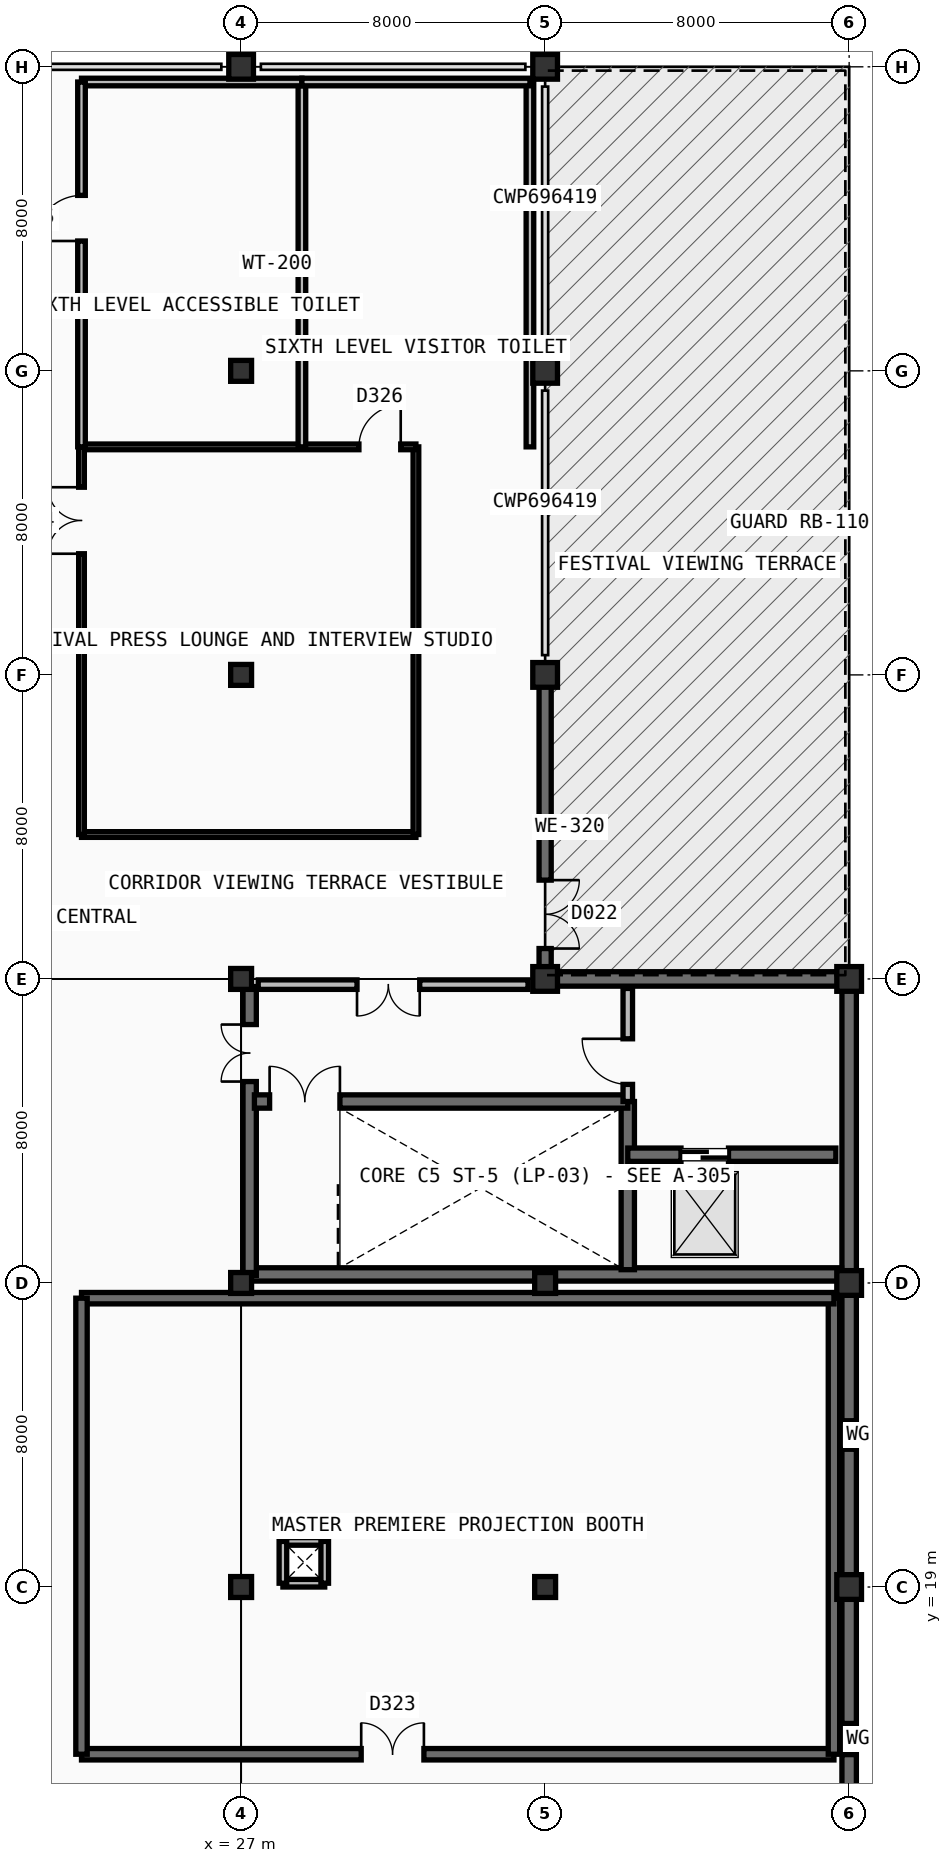
"""IFC4 building model, lengths in metres.
Left out: names, types, materials, properties, quantities, classifications, styles, units other than length and angle.
Written with IfcOpenShell. Run it as: python <this file> out.ifc"""

import sys

from ifc_helpers import new_model, si_unit, direction, frame, frame_2d, origin, origin_2d, place, context, subcontext, project, spatial, rectangle, extrude, element, fill, save


model = new_model("IFC4")
c1 = context("Model", 3, precision=1e-05, world=origin(), true_north=direction((0.0, 1.0)))
c2 = subcontext(c1, "Body", "Model", "MODEL_VIEW")
j1 = project(units=[si_unit("LENGTHUNIT", "METRE"), si_unit("PLANEANGLEUNIT", "RADIAN")], contexts=[c1])
p1 = place(None, origin())
s1 = spatial("IfcSite", under=j1, at=p1, CompositionType="ELEMENT")
p2 = place(p1, origin())
s2 = spatial("IfcBuilding", under=s1, at=p2, CompositionType="ELEMENT")
p3 = place(p2, frame((0.0, 0.0, 27.9)))
s3 = spatial("IfcBuildingStorey", under=s2, at=p3, CompositionType="ELEMENT", Elevation=27.9)
for number, where, z_axis, x_axis in (
    (1, (27.0, 19.0, 0.0), (0.0, 0.0, 1.0), (1.0, 0.0, 0.0)),
    (2, (27.0, 27.0, 0.0), (0.0, 0.0, 1.0), (1.0, 0.0, 0.0)),
    (3, (27.0, 35.0, 0.0), (0.0, 0.0, 1.0), (1.0, 0.0, 0.0)),
    (4, (27.0, 43.0, 0.0), (0.0, 0.0, 1.0), (1.0, 0.0, 0.0)),
    (5, (27.0, 51.0, 0.0), (0.0, 0.0, 1.0), (1.0, 0.0, 0.0)),
):
    element("IfcColumn", number, at=place(p3, frame(where, z_axis=z_axis, x_axis=x_axis)), inside=s3, PredefinedType="COLUMN", context=c2, shape_type="SweptSolid", body=[
        extrude(rectangle(XDim=0.55, YDim=0.55, at=origin_2d()), origin(), (0.0, 0.0, 1.0), 4.8),
    ])
p4 = place(p3, frame((27.0, 59.0, 0.0), z_axis=(0.0, 0.0, 1.0), x_axis=(1.0, 0.0, 0.0)))
e6 = element("IfcColumn", 6, at=p4, inside=s3, PredefinedType="COLUMN", context=c2, shape_type="SweptSolid", body=[
    extrude(rectangle(XDim=0.65, YDim=0.65, at=origin_2d()), origin(), (0.0, 0.0, 1.0), 4.8),
])
for number, where, z_axis, x_axis in (
    (7, (35.0, 19.0, 0.0), (0.0, 0.0, 1.0), (1.0, 0.0, 0.0)),
    (8, (35.0, 27.0, 0.0), (0.0, 0.0, 1.0), (1.0, 0.0, 0.0)),
):
    element("IfcColumn", number, at=place(p3, frame(where, z_axis=z_axis, x_axis=x_axis)), inside=s3, PredefinedType="COLUMN", context=c2, shape_type="SweptSolid", body=[
        extrude(rectangle(XDim=0.55, YDim=0.55, at=origin_2d()), origin(), (0.0, 0.0, 1.0), 4.8),
    ])
for number, where, z_axis, x_axis in (
    (9, (35.0, 35.0, 0.0), (0.0, 0.0, 1.0), (1.0, 0.0, 0.0)),
    (10, (35.0, 43.0, 0.0), (0.0, 0.0, 1.0), (1.0, 0.0, 0.0)),
    (11, (35.0, 51.0, 0.0), (0.0, 0.0, 1.0), (1.0, 0.0, 0.0)),
    (12, (35.0, 59.0, 0.0), (0.0, 0.0, 1.0), (1.0, 0.0, 0.0)),
    (13, (43.0, 19.0, 0.0), (0.0, 0.0, 1.0), (1.0, 0.0, 0.0)),
    (14, (43.0, 27.0, 0.0), (0.0, 0.0, 1.0), (1.0, 0.0, 0.0)),
    (15, (43.0, 35.0, 0.0), (0.0, 0.0, 1.0), (1.0, 0.0, 0.0)),
):
    element("IfcColumn", number, at=place(p3, frame(where, z_axis=z_axis, x_axis=x_axis)), inside=s3, PredefinedType="COLUMN", context=c2, shape_type="SweptSolid", body=[
        extrude(rectangle(XDim=0.65, YDim=0.65, at=origin_2d()), origin(), (0.0, 0.0, 1.0), 4.8),
    ])
p5 = place(p3, frame((35.0, 43.0, 0.0), z_axis=(0.0, 0.0, 1.0), x_axis=(0.0, -1.0, 0.0)))
e16 = element("IfcWall", 16, at=p5, inside=s3, PredefinedType="SOLIDWALL", context=c2, shape_type="SweptSolid", body=[
    extrude(rectangle(XDim=8.0, YDim=0.32, at=frame_2d((4.0, 0.0))), origin(), (0.0, 0.0, 1.0), 4.8),
])
p6 = place(p5, frame((5.4, 0.0, 0.0)))
e17 = element("IfcOpeningElement", 17, at=p6, cuts=e16, PredefinedType="OPENING", context=c2, shape_type="SweptSolid", body=[
    extrude(rectangle(XDim=1.8, YDim=2.3, at=frame_2d((0.9, 1.15))), frame((0.0, 0.17, 0.0), z_axis=(0.0, -1.0, 0.0), x_axis=(1.0, 0.0, 0.0)), (0.0, 0.0, 1.0), 0.34),
])
for number, where, z_axis, x_axis in (
    (18, (35.0, 35.0, 0.0), (0.0, 0.0, 1.0), (1.0, 0.0, 0.0)),
    (19, (43.0, 35.0, 0.0), (0.0, 0.0, 1.0), (0.0, -1.0, 0.0)),
):
    element("IfcWall", number, at=place(p3, frame(where, z_axis=z_axis, x_axis=x_axis)), inside=s3, PredefinedType="SOLIDWALL", context=c2, shape_type="SweptSolid", body=[
        extrude(rectangle(XDim=8.0, YDim=0.38, at=frame_2d((4.0, 0.0))), origin(), (0.0, 0.0, 1.0), 4.8),
    ])
p7 = place(p3, frame((43.0, 27.0, 0.0), z_axis=(0.0, 0.0, 1.0), x_axis=(0.0, -1.0, 0.0)))
e20 = element("IfcWall", 20, at=p7, inside=s3, PredefinedType="SOLIDWALL", context=c2, shape_type="SweptSolid", body=[
    extrude(rectangle(XDim=8.0, YDim=0.38, at=frame_2d((4.0, 0.0))), origin(), (0.0, 0.0, 1.0), 4.8),
])
p8 = place(p7, frame((3.625, 0.0, 1.05)))
e21 = element("IfcOpeningElement", 21, at=p8, cuts=e20, PredefinedType="OPENING", context=c2, shape_type="SweptSolid", body=[
    extrude(rectangle(XDim=0.75, YDim=1.3, at=frame_2d((0.375, 0.65))), frame((0.0, 0.2, 0.0), z_axis=(0.0, -1.0, 0.0), x_axis=(1.0, 0.0, 0.0)), (0.0, 0.0, 1.0), 0.4),
])
p9 = place(p3, frame((43.0, 19.0, 0.0), z_axis=(0.0, 0.0, 1.0), x_axis=(0.0, -1.0, 0.0)))
e22 = element("IfcWall", 22, at=p9, inside=s3, PredefinedType="SOLIDWALL", context=c2, shape_type="SweptSolid", body=[
    extrude(rectangle(XDim=8.0, YDim=0.38, at=frame_2d((4.0, 0.0))), origin(), (0.0, 0.0, 1.0), 4.8),
])
p10 = place(p9, frame((3.59, 0.0, 1.05)))
e23 = element("IfcOpeningElement", 23, at=p10, cuts=e22, PredefinedType="OPENING", context=c2, shape_type="SweptSolid", body=[
    extrude(rectangle(XDim=0.82, YDim=1.38, at=frame_2d((0.41, 0.69))), frame((0.0, 0.2, 0.0), z_axis=(0.0, -1.0, 0.0), x_axis=(1.0, 0.0, 0.0)), (0.0, 0.0, 1.0), 0.4),
])
p11 = place(p3, frame((27.2, 27.225, 0.0), z_axis=(0.0, 0.0, 1.0), x_axis=(1.0, 0.0, 0.0)))
e24 = element("IfcWall", 24, at=p11, inside=s3, PredefinedType="SHEAR", context=c2, shape_type="SweptSolid", body=[
    extrude(rectangle(XDim=15.6, YDim=0.35, at=frame_2d((7.8, 0.0))), origin(), (0.0, 0.0, 1.0), 4.54),
])
p12 = place(p3, frame((27.225, 27.2, 0.0), z_axis=(0.0, 0.0, 1.0), x_axis=(0.0, 1.0, 0.0)))
e25 = element("IfcWall", 25, at=p12, inside=s3, PredefinedType="SHEAR", context=c2, shape_type="SweptSolid", body=[
    extrude(rectangle(XDim=7.6, YDim=0.35, at=frame_2d((3.8, 0.0))), origin(), (0.0, 0.0, 1.0), 4.54),
])
p13 = place(p12, frame((5.1, 0.0, 0.0)))
e26 = element("IfcOpeningElement", 26, at=p13, cuts=e25, PredefinedType="OPENING", context=c2, shape_type="SweptSolid", body=[
    extrude(rectangle(XDim=1.5, YDim=2.2, at=frame_2d((0.75, 1.1))), frame((0.0, 0.185, 0.0), z_axis=(0.0, -1.0, 0.0), x_axis=(1.0, 0.0, 0.0)), (0.0, 0.0, 1.0), 0.37),
])
p14 = place(p3, frame((37.175, 27.35, 0.0), z_axis=(0.0, 0.0, 1.0), x_axis=(0.0, 1.0, 0.0)))
e27 = element("IfcWall", 27, at=p14, inside=s3, PredefinedType="SHEAR", context=c2, shape_type="SweptSolid", body=[
    extrude(rectangle(XDim=4.425, YDim=0.35, at=frame_2d((2.212, 0.0))), origin(), (0.0, 0.0, 1.0), 4.54),
])
p15 = place(p3, frame((27.35, 31.775, 0.0), z_axis=(0.0, 0.0, 1.0), x_axis=(1.0, 0.0, 0.0)))
e28 = element("IfcWall", 28, at=p15, inside=s3, PredefinedType="SHEAR", context=c2, shape_type="SweptSolid", body=[
    extrude(rectangle(XDim=9.825, YDim=0.35, at=frame_2d((4.913, 0.0))), origin(), (0.0, 0.0, 1.0), 4.54),
])
p16 = place(p15, frame((0.4, 0.0, 0.0)))
e29 = element("IfcOpeningElement", 29, at=p16, cuts=e28, PredefinedType="OPENING", context=c2, shape_type="SweptSolid", body=[
    extrude(rectangle(XDim=1.85, YDim=2.25, at=frame_2d((0.925, 1.125))), frame((0.0, 0.185, 0.0), z_axis=(0.0, -1.0, 0.0), x_axis=(1.0, 0.0, 0.0)), (0.0, 0.0, 1.0), 0.37),
])
p17 = place(p3, frame((37.175, 30.375, 0.0), z_axis=(0.0, 0.0, 1.0), x_axis=(1.0, 0.0, 0.0)))
e30 = element("IfcWall", 30, at=p17, inside=s3, PredefinedType="SHEAR", context=c2, shape_type="SweptSolid", body=[
    extrude(rectangle(XDim=5.475, YDim=0.35, at=frame_2d((2.737, 0.0))), origin(), (0.0, 0.0, 1.0), 4.54),
])
p18 = place(p17, frame((1.4, 0.0, 0.0)))
e31 = element("IfcOpeningElement", 31, at=p18, cuts=e30, PredefinedType="OPENING", context=c2, shape_type="SweptSolid", body=[
    extrude(rectangle(XDim=1.25, YDim=2.25, at=frame_2d((0.625, 1.125))), frame((0.0, 0.185, 0.0), z_axis=(0.0, -1.0, 0.0), x_axis=(1.0, 0.0, 0.0)), (0.0, 0.0, 1.0), 0.37),
])
p19 = place(p3, frame((37.175, 31.775, 0.0), z_axis=(0.0, 0.0, 1.0), x_axis=(0.0, 1.0, 0.0)))
e32 = element("IfcWall", 32, at=p19, inside=s3, PredefinedType="PARTITIONING", context=c2, shape_type="SweptSolid", body=[
    extrude(rectangle(XDim=2.975, YDim=0.25, at=frame_2d((1.488, 0.0))), origin(), (0.0, 0.0, 1.0), 4.54),
])
p20 = place(p19, frame((0.45, 0.0, 0.0)))
e33 = element("IfcOpeningElement", 33, at=p20, cuts=e32, PredefinedType="OPENING", context=c2, shape_type="SweptSolid", body=[
    extrude(rectangle(XDim=1.2, YDim=2.2, at=frame_2d((0.6, 1.1))), frame((0.0, 0.135, 0.0), z_axis=(0.0, -1.0, 0.0), x_axis=(1.0, 0.0, 0.0)), (0.0, 0.0, 1.0), 0.27),
])
p21 = place(p3, frame((27.45, 34.85, 0.0), z_axis=(0.0, 0.0, 1.0), x_axis=(1.0, 0.0, 0.0)))
e34 = element("IfcWall", 34, at=p21, inside=s3, PredefinedType="PARTITIONING", context=c2, shape_type="SweptSolid", body=[
    extrude(rectangle(XDim=7.1, YDim=0.25, at=frame_2d((3.55, 0.0))), origin(), (0.0, 0.0, 1.0), 4.54),
])
p22 = place(p21, frame((2.6, 0.0, 0.0)))
e35 = element("IfcOpeningElement", 35, at=p22, cuts=e34, PredefinedType="OPENING", context=c2, shape_type="SweptSolid", body=[
    extrude(rectangle(XDim=1.65, YDim=2.25, at=frame_2d((0.825, 1.125))), frame((0.0, 0.135, 0.0), z_axis=(0.0, -1.0, 0.0), x_axis=(1.0, 0.0, 0.0)), (0.0, 0.0, 1.0), 0.27),
])
p23 = place(p3, frame((22.8, 14.6, 0.0), z_axis=(0.0, 0.0, 1.0), x_axis=(1.0, 0.0, 0.0)))
e36 = element("IfcWall", 36, at=p23, inside=s3, PredefinedType="SHEAR", context=c2, shape_type="SweptSolid", body=[
    extrude(rectangle(XDim=19.8, YDim=0.3, at=frame_2d((9.9, 0.0))), origin(), (0.0, 0.0, 1.0), 4.54),
])
p24 = place(p23, frame((7.36, 0.0, 0.0)))
e37 = element("IfcOpeningElement", 37, at=p24, cuts=e36, PredefinedType="OPENING", context=c2, shape_type="SweptSolid", body=[
    extrude(rectangle(XDim=1.65, YDim=2.25, at=frame_2d((0.825, 1.125))), frame((0.0, 0.16, 0.0), z_axis=(0.0, -1.0, 0.0), x_axis=(1.0, 0.0, 0.0)), (0.0, 0.0, 1.0), 0.32),
])
p25 = place(p3, frame((42.6, 14.6, 0.0), z_axis=(0.0, 0.0, 1.0), x_axis=(0.0, 1.0, 0.0)))
e38 = element("IfcWall", 38, at=p25, inside=s3, PredefinedType="SHEAR", context=c2, shape_type="SweptSolid", body=[
    extrude(rectangle(XDim=12.0, YDim=0.3, at=frame_2d((6.0, 0.0))), origin(), (0.0, 0.0, 1.0), 4.54),
])
p26 = place(p3, frame((22.8, 26.6, 0.0), z_axis=(0.0, 0.0, 1.0), x_axis=(1.0, 0.0, 0.0)))
e39 = element("IfcWall", 39, at=p26, inside=s3, PredefinedType="SHEAR", context=c2, shape_type="SweptSolid", body=[
    extrude(rectangle(XDim=19.8, YDim=0.3, at=frame_2d((9.9, 0.0))), origin(), (0.0, 0.0, 1.0), 4.54),
])
p27 = place(p3, frame((22.8, 14.6, 0.0), z_axis=(0.0, 0.0, 1.0), x_axis=(0.0, 1.0, 0.0)))
e40 = element("IfcWall", 40, at=p27, inside=s3, PredefinedType="SHEAR", context=c2, shape_type="SweptSolid", body=[
    extrude(rectangle(XDim=12.0, YDim=0.3, at=frame_2d((6.0, 0.0))), origin(), (0.0, 0.0, 1.0), 4.54),
])
p28 = place(p3, frame((22.8, 38.8, 0.0), z_axis=(0.0, 0.0, 1.0), x_axis=(1.0, 0.0, 0.0)))
e41 = element("IfcWall", 41, at=p28, inside=s3, PredefinedType="PARTITIONING", context=c2, shape_type="SweptSolid", body=[
    extrude(rectangle(XDim=8.8, YDim=0.15, at=frame_2d((4.4, 0.0))), origin(), (0.0, 0.0, 1.0), 4.54),
])
p29 = place(p3, frame((31.6, 38.8, 0.0), z_axis=(0.0, 0.0, 1.0), x_axis=(0.0, 1.0, 0.0)))
e42 = element("IfcWall", 42, at=p29, inside=s3, PredefinedType="PARTITIONING", context=c2, shape_type="SweptSolid", body=[
    extrude(rectangle(XDim=10.2, YDim=0.15, at=frame_2d((5.1, 0.0))), origin(), (0.0, 0.0, 1.0), 4.54),
])
p30 = place(p3, frame((22.8, 49.0, 0.0), z_axis=(0.0, 0.0, 1.0), x_axis=(1.0, 0.0, 0.0)))
e43 = element("IfcWall", 43, at=p30, inside=s3, PredefinedType="PARTITIONING", context=c2, shape_type="SweptSolid", body=[
    extrude(rectangle(XDim=8.8, YDim=0.15, at=frame_2d((4.4, 0.0))), origin(), (0.0, 0.0, 1.0), 4.54),
])
p31 = place(p30, frame((7.3, 0.0, 0.0)))
e44 = element("IfcOpeningElement", 44, at=p31, cuts=e43, PredefinedType="OPENING", context=c2, shape_type="SweptSolid", body=[
    extrude(rectangle(XDim=1.1, YDim=2.16, at=frame_2d((0.55, 1.08))), frame((0.0, 0.085, 0.0), z_axis=(0.0, -1.0, 0.0), x_axis=(1.0, 0.0, 0.0)), (0.0, 0.0, 1.0), 0.17),
])
p32 = place(p3, frame((22.8, 38.8, 0.0), z_axis=(0.0, 0.0, 1.0), x_axis=(0.0, 1.0, 0.0)))
e45 = element("IfcWall", 45, at=p32, inside=s3, PredefinedType="PARTITIONING", context=c2, shape_type="SweptSolid", body=[
    extrude(rectangle(XDim=10.2, YDim=0.15, at=frame_2d((5.1, 0.0))), origin(), (0.0, 0.0, 1.0), 4.54),
])
p33 = place(p32, frame((7.388, 0.0, 0.0)))
e46 = element("IfcOpeningElement", 46, at=p33, cuts=e45, PredefinedType="OPENING", context=c2, shape_type="SweptSolid", body=[
    extrude(rectangle(XDim=1.75, YDim=2.3, at=frame_2d((0.875, 1.15))), frame((0.0, 0.085, 0.0), z_axis=(0.0, -1.0, 0.0), x_axis=(1.0, 0.0, 0.0)), (0.0, 0.0, 1.0), 0.17),
])
p34 = place(p3, frame((28.6, 49.0, 0.0), z_axis=(0.0, 0.0, 1.0), x_axis=(0.0, 1.0, 0.0)))
e47 = element("IfcWall", 47, at=p34, inside=s3, PredefinedType="PARTITIONING", context=c2, shape_type="SweptSolid", body=[
    extrude(rectangle(XDim=9.6, YDim=0.2, at=frame_2d((4.8, 0.0))), origin(), (0.0, 0.0, 1.0), 4.54),
])
p35 = place(p3, frame((22.8, 58.6, 0.0), z_axis=(0.0, 0.0, 1.0), x_axis=(1.0, 0.0, 0.0)))
e48 = element("IfcWall", 48, at=p35, inside=s3, PredefinedType="PARTITIONING", context=c2, shape_type="SweptSolid", body=[
    extrude(rectangle(XDim=5.8, YDim=0.2, at=frame_2d((2.9, 0.0))), origin(), (0.0, 0.0, 1.0), 4.54),
])
p36 = place(p3, frame((22.8, 49.0, 0.0), z_axis=(0.0, 0.0, 1.0), x_axis=(0.0, 1.0, 0.0)))
e49 = element("IfcWall", 49, at=p36, inside=s3, PredefinedType="PARTITIONING", context=c2, shape_type="SweptSolid", body=[
    extrude(rectangle(XDim=9.6, YDim=0.2, at=frame_2d((4.8, 0.0))), origin(), (0.0, 0.0, 1.0), 4.54),
])
p37 = place(p36, frame((5.417, 0.0, 0.0)))
e50 = element("IfcOpeningElement", 50, at=p37, cuts=e49, PredefinedType="OPENING", context=c2, shape_type="SweptSolid", body=[
    extrude(rectangle(XDim=1.2, YDim=2.2, at=frame_2d((0.6, 1.1))), frame((0.0, 0.11, 0.0), z_axis=(0.0, -1.0, 0.0), x_axis=(1.0, 0.0, 0.0)), (0.0, 0.0, 1.0), 0.22),
])
p38 = place(p3, frame((34.6, 49.0, 0.0), z_axis=(0.0, 0.0, 1.0), x_axis=(0.0, 1.0, 0.0)))
e51 = element("IfcWall", 51, at=p38, inside=s3, PredefinedType="PARTITIONING", context=c2, shape_type="SweptSolid", body=[
    extrude(rectangle(XDim=9.6, YDim=0.2, at=frame_2d((4.8, 0.0))), origin(), (0.0, 0.0, 1.0), 4.54),
])
p39 = place(p3, frame((28.6, 58.6, 0.0), z_axis=(0.0, 0.0, 1.0), x_axis=(1.0, 0.0, 0.0)))
e52 = element("IfcWall", 52, at=p39, inside=s3, PredefinedType="PARTITIONING", context=c2, shape_type="SweptSolid", body=[
    extrude(rectangle(XDim=6.0, YDim=0.2, at=frame_2d((3.0, 0.0))), origin(), (0.0, 0.0, 1.0), 4.54),
])
for number, where, z_axis, x_axis in (
    (53, (28.1, 19.1, 0.0), (0.0, 0.0, 1.0), (1.0, 0.0, 0.0)),
    (54, (28.1, 20.2, 0.0), (0.0, 0.0, 1.0), (1.0, 0.0, 0.0)),
    (55, (28.1, 19.1, 0.0), (0.0, 0.0, 1.0), (0.0, 1.0, 0.0)),
    (56, (29.2, 19.1, 0.0), (0.0, 0.0, 1.0), (0.0, 1.0, 0.0)),
):
    element("IfcWall", number, at=place(p3, frame(where, z_axis=z_axis, x_axis=x_axis)), inside=s3, PredefinedType="PARTITIONING", context=c2, shape_type="SweptSolid", body=[
        extrude(rectangle(XDim=1.1, YDim=0.2, at=frame_2d((0.55, 0.0))), origin(), (0.0, 0.0, 1.0), 4.54),
    ])
p40 = place(p6, origin())
e57 = element("IfcDoor", 57, at=p40, inside=s3, OperationType="DOUBLE_DOOR_SINGLE_SWING", PredefinedType="DOOR", context=c2, shape_type="SweptSolid", body=[
    extrude(rectangle(XDim=1.8, YDim=2.3, at=frame_2d((0.9, 1.15))), frame((0.0, 0.025, 0.0), z_axis=(0.0, -1.0, 0.0), x_axis=(1.0, 0.0, 0.0)), (0.0, 0.0, 1.0), 0.05),
])
fill(e17, e57)
p41 = place(p8, origin())
e58 = element("IfcWindow", 58, at=p41, inside=s3, PartitioningType="SINGLE_PANEL", PredefinedType="WINDOW", context=c2, shape_type="SweptSolid", body=[
    extrude(rectangle(XDim=0.75, YDim=1.3, at=frame_2d((0.375, 0.65))), frame((0.0, 0.03, 0.0), z_axis=(0.0, -1.0, 0.0), x_axis=(1.0, 0.0, 0.0)), (0.0, 0.0, 1.0), 0.06),
])
fill(e21, e58)
p42 = place(p10, origin())
e59 = element("IfcWindow", 59, at=p42, inside=s3, PartitioningType="SINGLE_PANEL", PredefinedType="WINDOW", context=c2, shape_type="SweptSolid", body=[
    extrude(rectangle(XDim=0.82, YDim=1.38, at=frame_2d((0.41, 0.69))), frame((0.0, 0.03, 0.0), z_axis=(0.0, -1.0, 0.0), x_axis=(1.0, 0.0, 0.0)), (0.0, 0.0, 1.0), 0.06),
])
fill(e23, e59)
p43 = place(p16, origin())
e60 = element("IfcDoor", 60, at=p43, inside=s3, OperationType="DOUBLE_DOOR_SINGLE_SWING", PredefinedType="DOOR", context=c2, shape_type="SweptSolid", body=[
    extrude(rectangle(XDim=1.85, YDim=2.25, at=frame_2d((0.925, 1.125))), frame((0.0, 0.025, 0.0), z_axis=(0.0, -1.0, 0.0), x_axis=(1.0, 0.0, 0.0)), (0.0, 0.0, 1.0), 0.05),
])
fill(e29, e60)
p44 = place(p18, origin())
e61 = element("IfcDoor", 61, at=p44, inside=s3, OperationType="DOUBLE_DOOR_SLIDING", PredefinedType="DOOR", context=c2, shape_type="SweptSolid", body=[
    extrude(rectangle(XDim=1.25, YDim=2.25, at=frame_2d((0.625, 1.125))), frame((0.0, 0.025, 0.0), z_axis=(0.0, -1.0, 0.0), x_axis=(1.0, 0.0, 0.0)), (0.0, 0.0, 1.0), 0.05),
])
fill(e31, e61)
p45 = place(p20, origin())
e62 = element("IfcDoor", 62, at=p45, inside=s3, OperationType="SINGLE_SWING_RIGHT", PredefinedType="DOOR", context=c2, shape_type="SweptSolid", body=[
    extrude(rectangle(XDim=1.2, YDim=2.2, at=frame_2d((0.6, 1.1))), frame((0.0, 0.025, 0.0), z_axis=(0.0, -1.0, 0.0), x_axis=(1.0, 0.0, 0.0)), (0.0, 0.0, 1.0), 0.05),
])
fill(e33, e62)
p46 = place(p22, frame((1.65, 0.0, 0.0), z_axis=(0.0, 0.0, 1.0), x_axis=(-1.0, 0.0, 0.0)))
e63 = element("IfcDoor", 63, at=p46, inside=s3, OperationType="DOUBLE_DOOR_SINGLE_SWING", PredefinedType="DOOR", context=c2, shape_type="SweptSolid", body=[
    extrude(rectangle(XDim=1.65, YDim=2.25, at=frame_2d((0.825, 1.125))), frame((0.0, 0.025, 0.0), z_axis=(0.0, -1.0, 0.0), x_axis=(1.0, 0.0, 0.0)), (0.0, 0.0, 1.0), 0.05),
])
fill(e35, e63)
p47 = place(p13, origin())
e64 = element("IfcDoor", 64, at=p47, inside=s3, OperationType="DOUBLE_DOOR_SINGLE_SWING", PredefinedType="DOOR", context=c2, shape_type="SweptSolid", body=[
    extrude(rectangle(XDim=1.5, YDim=2.2, at=frame_2d((0.75, 1.1))), frame((0.0, 0.025, 0.0), z_axis=(0.0, -1.0, 0.0), x_axis=(1.0, 0.0, 0.0)), (0.0, 0.0, 1.0), 0.05),
])
fill(e26, e64)
p48 = place(p24, origin())
e65 = element("IfcDoor", 65, at=p48, inside=s3, OperationType="DOUBLE_DOOR_SINGLE_SWING", PredefinedType="DOOR", context=c2, shape_type="SweptSolid", body=[
    extrude(rectangle(XDim=1.65, YDim=2.25, at=frame_2d((0.825, 1.125))), frame((0.0, 0.025, 0.0), z_axis=(0.0, -1.0, 0.0), x_axis=(1.0, 0.0, 0.0)), (0.0, 0.0, 1.0), 0.05),
])
fill(e37, e65)
p49 = place(p33, origin())
e66 = element("IfcDoor", 66, at=p49, inside=s3, OperationType="DOUBLE_DOOR_SINGLE_SWING", PredefinedType="DOOR", context=c2, shape_type="SweptSolid", body=[
    extrude(rectangle(XDim=1.75, YDim=2.3, at=frame_2d((0.875, 1.15))), frame((0.0, 0.025, 0.0), z_axis=(0.0, -1.0, 0.0), x_axis=(1.0, 0.0, 0.0)), (0.0, 0.0, 1.0), 0.05),
])
fill(e46, e66)
p50 = place(p37, origin())
e67 = element("IfcDoor", 67, at=p50, inside=s3, OperationType="SINGLE_SWING_LEFT", PredefinedType="DOOR", context=c2, shape_type="SweptSolid", body=[
    extrude(rectangle(XDim=1.2, YDim=2.2, at=frame_2d((0.6, 1.1))), frame((0.0, 0.025, 0.0), z_axis=(0.0, -1.0, 0.0), x_axis=(1.0, 0.0, 0.0)), (0.0, 0.0, 1.0), 0.05),
])
fill(e50, e67)
p51 = place(p31, origin())
e68 = element("IfcDoor", 68, at=p51, inside=s3, OperationType="SINGLE_SWING_RIGHT", PredefinedType="DOOR", context=c2, shape_type="SweptSolid", body=[
    extrude(rectangle(XDim=1.1, YDim=2.16, at=frame_2d((0.55, 1.08))), frame((0.0, 0.025, 0.0), z_axis=(0.0, -1.0, 0.0), x_axis=(1.0, 0.0, 0.0)), (0.0, 0.0, 1.0), 0.05),
])
fill(e44, e68)
save(model, sys.argv[1])
